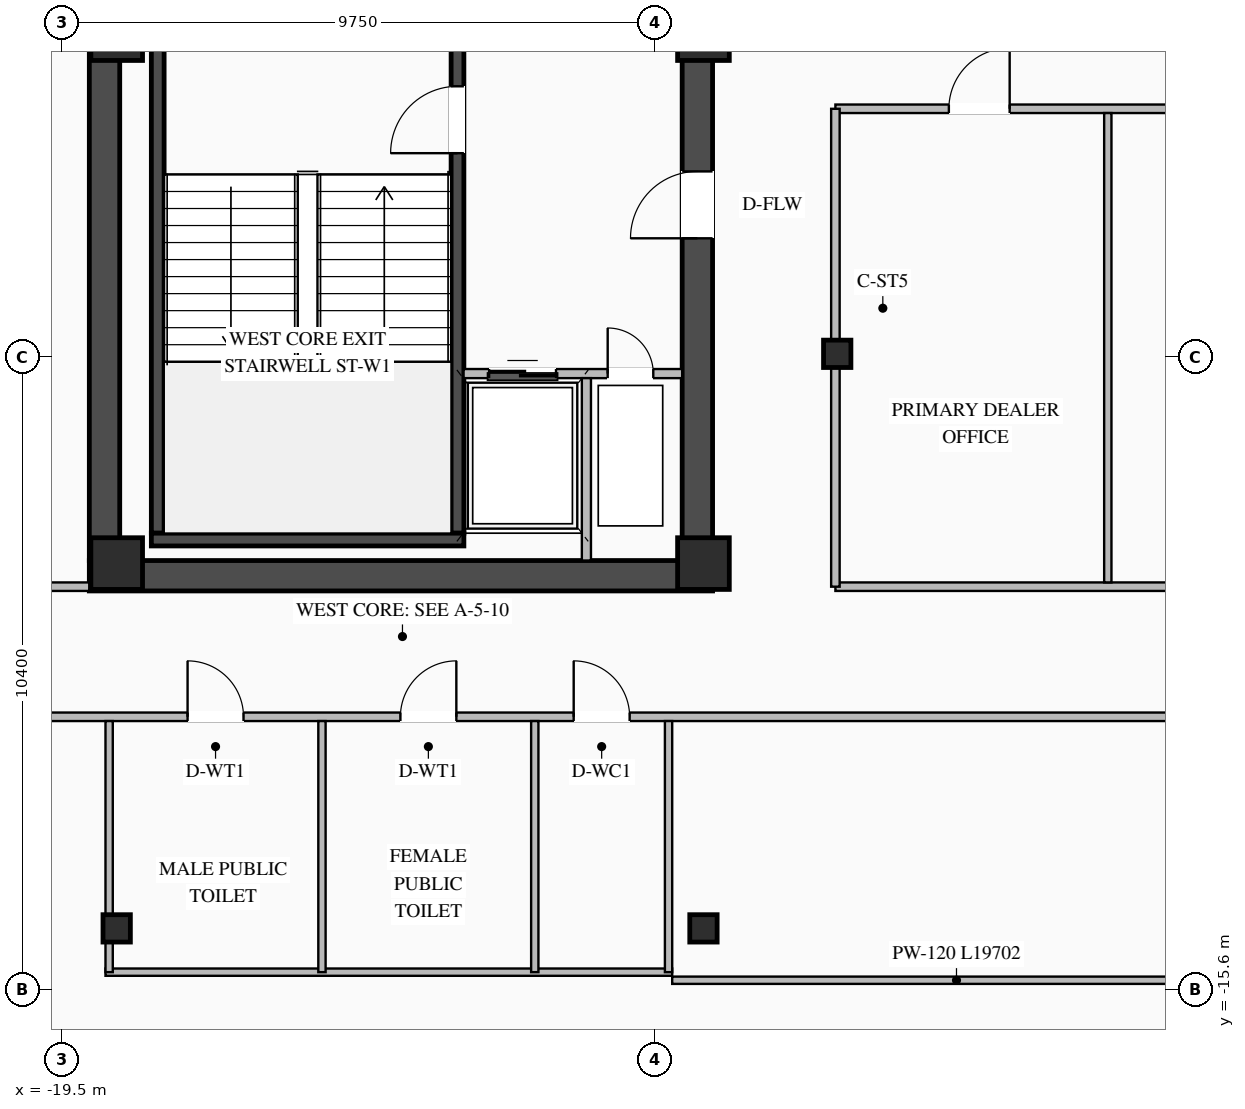
"""IFC4 building model, lengths in metres.
Left out: names, types, materials, properties, quantities, classifications, styles, units other than length and angle.
Written with IfcOpenShell. Run it as: python <this file> out.ifc"""

import sys

from ifc_helpers import new_model, si_unit, direction, frame, frame_2d, origin, origin_2d, place, context, subcontext, project, spatial, rectangle, i_section, extrude, element, fill, save


model = new_model("IFC4")
c1 = context("Model", 3, precision=1e-05, world=origin(), true_north=direction((0.0, 1.0)))
c2 = subcontext(c1, "Body", "Model", "MODEL_VIEW")
j1 = project(units=[si_unit("LENGTHUNIT", "METRE"), si_unit("PLANEANGLEUNIT", "RADIAN")], contexts=[c1])
p1 = place(None, origin())
s1 = spatial("IfcSite", under=j1, at=p1, CompositionType="ELEMENT")
p2 = place(p1, origin())
s2 = spatial("IfcBuilding", under=s1, at=p2, CompositionType="ELEMENT")
p3 = place(p2, frame((0.0, 0.0, 282.75)))
s3 = spatial("IfcBuildingStorey", under=s2, at=p3, CompositionType="ELEMENT", Elevation=282.75)
p4 = place(p3, frame((-19.05, -8.8, 0.0), z_axis=(0.0, 0.0, 1.0), x_axis=(1.0, 0.0, 0.0)))
e1 = element("IfcWall", 1, at=p4, inside=s3, PredefinedType="SHEAR", context=c2, shape_type="SweptSolid", body=[
    extrude(rectangle(XDim=10.25, YDim=0.5, at=frame_2d((5.125, 0.0))), origin(), (0.0, 0.0, 1.0), 3.95),
])
p5 = place(p3, frame((-18.8, -8.55, 0.0), z_axis=(0.0, 0.0, 1.0), x_axis=(0.0, 1.0, 0.0)))
e2 = element("IfcWall", 2, at=p5, inside=s3, PredefinedType="SHEAR", context=c2, shape_type="SweptSolid", body=[
    extrude(rectangle(XDim=17.1, YDim=0.5, at=frame_2d((8.55, 0.0))), origin(), (0.0, 0.0, 1.0), 3.95),
])
p6 = place(p3, frame((-9.05, -8.55, 0.0), z_axis=(0.0, 0.0, 1.0), x_axis=(0.0, 1.0, 0.0)))
e3 = element("IfcWall", 3, at=p6, inside=s3, PredefinedType="SHEAR", context=c2, shape_type="SweptSolid", body=[
    extrude(rectangle(XDim=17.1, YDim=0.5, at=frame_2d((8.55, 0.0))), origin(), (0.0, 0.0, 1.0), 3.95),
])
p7 = place(p6, frame((5.3, 0.0, 0.0)))
e4 = element("IfcOpeningElement", 4, at=p7, cuts=e3, PredefinedType="OPENING", context=c2, shape_type="SweptSolid", body=[
    extrude(rectangle(XDim=1.1, YDim=2.08, at=frame_2d((0.55, 1.04))), frame((0.0, 0.26, 0.0), z_axis=(0.0, -1.0, 0.0), x_axis=(1.0, 0.0, 0.0)), (0.0, 0.0, 1.0), 0.52),
])
p8 = place(p3, frame((-12.995, -8.1, 0.0), z_axis=(0.0, 0.0, 1.0), x_axis=(0.0, 1.0, 0.0)))
e5 = element("IfcWall", 5, at=p8, inside=s3, PredefinedType="SHEAR", context=c2, shape_type="SweptSolid", body=[
    extrude(rectangle(XDim=8.2, YDim=0.21, at=frame_2d((4.1, 0.0))), origin(), (0.0, 0.0, 1.0), 3.95),
])
p9 = place(p8, frame((6.25, 0.0, 0.0)))
e6 = element("IfcOpeningElement", 6, at=p9, cuts=e5, PredefinedType="OPENING", context=c2, shape_type="SweptSolid", body=[
    extrude(rectangle(XDim=1.1, YDim=2.15, at=frame_2d((0.55, 1.075))), frame((0.0, 0.115, 0.0), z_axis=(0.0, -1.0, 0.0), x_axis=(1.0, 0.0, 0.0)), (0.0, 0.0, 1.0), 0.23),
])
p10 = place(p3, frame((-17.925, -8.1, 0.0), z_axis=(0.0, 0.0, 1.0), x_axis=(0.0, 1.0, 0.0)))
e7 = element("IfcWall", 7, at=p10, inside=s3, PredefinedType="SHEAR", context=c2, shape_type="SweptSolid", body=[
    extrude(rectangle(XDim=8.2, YDim=0.21, at=frame_2d((4.1, 0.0))), origin(), (0.0, 0.0, 1.0), 3.95),
])
p11 = place(p3, frame((-18.03, -8.205, 0.0), z_axis=(0.0, 0.0, 1.0), x_axis=(1.0, 0.0, 0.0)))
e8 = element("IfcWall", 8, at=p11, inside=s3, PredefinedType="SHEAR", context=c2, shape_type="SweptSolid", body=[
    extrude(rectangle(XDim=5.14, YDim=0.21, at=frame_2d((2.57, 0.0))), origin(), (0.0, 0.0, 1.0), 3.95),
])
for number, where, z_axis, x_axis in (
    (9, (-8.95, -8.6, 0.0), (0.0, 0.0, 1.0), (1.0, 0.0, 0.0)),
    (10, (-8.95, 0.1, 0.0), (0.0, 0.0, 1.0), (1.0, 0.0, 0.0)),
    (11, (-18.6, -8.6, 0.0), (0.0, 0.0, 1.0), (1.0, 0.0, 0.0)),
    (12, (-18.6, 0.1, 0.0), (0.0, 0.0, 1.0), (1.0, 0.0, 0.0)),
):
    element("IfcColumn", number, at=place(p3, frame(where, z_axis=z_axis, x_axis=x_axis)), inside=s3, PredefinedType="COLUMN", context=c2, shape_type="SweptSolid", body=[
        extrude(rectangle(XDim=0.85, YDim=0.85, at=origin_2d()), origin(), (0.0, 0.0, 1.0), 4.2),
    ])
for number, where, z_axis, x_axis in (
    (13, (-6.75, -5.15, 0.0), (0.0, 0.0, 1.0), (1.0, 0.0, 0.0)),
    (14, (-18.6, -14.6, 0.0), (0.0, 0.0, 1.0), (1.0, 0.0, 0.0)),
    (15, (-8.95, -14.6, 0.0), (0.0, 0.0, 1.0), (1.0, 0.0, 0.0)),
):
    element("IfcColumn", number, at=place(p3, frame(where, z_axis=z_axis, x_axis=x_axis)), inside=s3, PredefinedType="COLUMN", context=c2, shape_type="SweptSolid", body=[
        extrude(i_section(OverallWidth=0.45, OverallDepth=0.45, WebThickness=0.022, FlangeThickness=0.032, at=origin_2d()), origin(), (0.0, 0.0, 1.0), 4.2),
    ])
p12 = place(p3, frame((-12.895, -5.475, 0.0), z_axis=(0.0, 0.0, 1.0), x_axis=(1.0, 0.0, 0.0)))
e16 = element("IfcWall", 16, at=p12, inside=s3, PredefinedType="STANDARD", context=c2, shape_type="SweptSolid", body=[
    extrude(rectangle(XDim=3.595, YDim=0.15, at=frame_2d((1.797, 0.0))), origin(), (0.0, 0.0, 1.0), 3.93),
])
p13 = place(p12, frame((0.42, 0.0, 0.0)))
e17 = element("IfcOpeningElement", 17, at=p13, cuts=e16, PredefinedType="OPENING", context=c2, shape_type="SweptSolid", body=[
    extrude(rectangle(XDim=1.1, YDim=2.15, at=frame_2d((0.55, 1.075))), frame((0.0, 0.085, 0.0), z_axis=(0.0, -1.0, 0.0), x_axis=(1.0, 0.0, 0.0)), (0.0, 0.0, 1.0), 0.17),
])
p14 = place(p12, frame((2.37, 0.0, 0.0)))
e18 = element("IfcOpeningElement", 18, at=p14, cuts=e16, PredefinedType="OPENING", context=c2, shape_type="SweptSolid", body=[
    extrude(rectangle(XDim=0.75, YDim=2.05, at=frame_2d((0.375, 1.025))), frame((0.0, 0.085, 0.0), z_axis=(0.0, -1.0, 0.0), x_axis=(1.0, 0.0, 0.0)), (0.0, 0.0, 1.0), 0.17),
])
p15 = place(p3, frame((-10.875, -8.55, 0.0), z_axis=(0.0, 0.0, 1.0), x_axis=(0.0, 1.0, 0.0)))
e19 = element("IfcWall", 19, at=p15, inside=s3, PredefinedType="STANDARD", context=c2, shape_type="SweptSolid", body=[
    extrude(rectangle(XDim=3.0, YDim=0.15, at=frame_2d((1.5, 0.0))), origin(), (0.0, 0.0, 1.0), 3.93),
])
p16 = place(p3, frame((-21.591, -11.12, 0.0), z_axis=(0.0, 0.0, 1.0), x_axis=(1.0, 0.0, 0.0)))
e20 = element("IfcWall", 20, at=p16, inside=s3, PredefinedType="STANDARD", context=c2, shape_type="SweptSolid", body=[
    extrude(rectangle(XDim=53.285, YDim=0.14, at=frame_2d((26.643, 0.0))), origin(), (0.0, 0.0, 1.0), 3.93),
])
p17 = place(p16, frame((4.157, 0.0, 0.0)))
e21 = element("IfcOpeningElement", 21, at=p17, cuts=e20, PredefinedType="OPENING", context=c2, shape_type="SweptSolid", body=[
    extrude(rectangle(XDim=0.92, YDim=2.08, at=frame_2d((0.46, 1.04))), frame((0.0, 0.08, 0.0), z_axis=(0.0, -1.0, 0.0), x_axis=(1.0, 0.0, 0.0)), (0.0, 0.0, 1.0), 0.16),
])
p18 = place(p16, frame((7.657, 0.0, 0.0)))
e22 = element("IfcOpeningElement", 22, at=p18, cuts=e20, PredefinedType="OPENING", context=c2, shape_type="SweptSolid", body=[
    extrude(rectangle(XDim=0.92, YDim=2.08, at=frame_2d((0.46, 1.04))), frame((0.0, 0.08, 0.0), z_axis=(0.0, -1.0, 0.0), x_axis=(1.0, 0.0, 0.0)), (0.0, 0.0, 1.0), 0.16),
])
p19 = place(p16, frame((10.507, 0.0, 0.0)))
e23 = element("IfcOpeningElement", 23, at=p19, cuts=e20, PredefinedType="OPENING", context=c2, shape_type="SweptSolid", body=[
    extrude(rectangle(XDim=0.92, YDim=2.08, at=frame_2d((0.46, 1.04))), frame((0.0, 0.08, 0.0), z_axis=(0.0, -1.0, 0.0), x_axis=(1.0, 0.0, 0.0)), (0.0, 0.0, 1.0), 0.16),
])
p20 = place(p16, frame((21.478, 0.0, 0.0)))
e24 = element("IfcOpeningElement", 24, at=p20, cuts=e20, PredefinedType="OPENING", context=c2, shape_type="SweptSolid", body=[
    extrude(rectangle(XDim=1.0, YDim=2.08, at=frame_2d((0.5, 1.04))), frame((0.0, 0.08, 0.0), z_axis=(0.0, -1.0, 0.0), x_axis=(1.0, 0.0, 0.0)), (0.0, 0.0, 1.0), 0.16),
])
p21 = place(p16, frame((41.961, 0.0, 0.0)))
e25 = element("IfcOpeningElement", 25, at=p21, cuts=e20, PredefinedType="OPENING", context=c2, shape_type="SweptSolid", body=[
    extrude(rectangle(XDim=1.0, YDim=2.08, at=frame_2d((0.5, 1.04))), frame((0.0, 0.08, 0.0), z_axis=(0.0, -1.0, 0.0), x_axis=(1.0, 0.0, 0.0)), (0.0, 0.0, 1.0), 0.16),
])
p22 = place(p3, frame((-18.784, -15.32, 0.0), z_axis=(0.0, 0.0, 1.0), x_axis=(1.0, 0.0, 0.0)))
e26 = element("IfcWall", 26, at=p22, inside=s3, PredefinedType="STANDARD", context=c2, shape_type="SweptSolid", body=[
    extrude(rectangle(XDim=9.32, YDim=0.12, at=frame_2d((4.66, 0.0))), origin(), (0.0, 0.0, 1.0), 3.93),
])
for number, where, z_axis, x_axis in (
    (27, (-18.724, -15.32, 0.0), (0.0, 0.0, 1.0), (0.0, 1.0, 0.0)),
    (28, (-15.224, -15.32, 0.0), (0.0, 0.0, 1.0), (0.0, 1.0, 0.0)),
    (29, (-11.724, -15.32, 0.0), (0.0, 0.0, 1.0), (0.0, 1.0, 0.0)),
    (30, (-9.524, -15.32, 0.0), (0.0, 0.0, 1.0), (0.0, 1.0, 0.0)),
):
    element("IfcWall", number, at=place(p3, frame(where, z_axis=z_axis, x_axis=x_axis)), inside=s3, PredefinedType="STANDARD", context=c2, shape_type="SweptSolid", body=[
        extrude(rectangle(XDim=4.13, YDim=0.12, at=frame_2d((2.065, 0.0))), origin(), (0.0, 0.0, 1.0), 3.93),
    ])
p23 = place(p3, frame((-9.464, -15.453, 0.0), z_axis=(0.0, 0.0, 1.0), x_axis=(1.0, 0.0, 0.0)))
e31 = element("IfcWall", 31, at=p23, inside=s3, PredefinedType="STANDARD", context=c2, shape_type="SweptSolid", body=[
    extrude(rectangle(XDim=19.702, YDim=0.12, at=frame_2d((9.851, 0.0))), origin(), (0.0, 0.0, 1.0), 3.93),
])
p24 = place(p23, frame((9.351, 0.0, 0.0)))
e32 = element("IfcOpeningElement", 32, at=p24, cuts=e31, PredefinedType="OPENING", context=c2, shape_type="SweptSolid", body=[
    extrude(rectangle(XDim=1.0, YDim=2.08, at=frame_2d((0.5, 1.04))), frame((0.0, 0.07, 0.0), z_axis=(0.0, -1.0, 0.0), x_axis=(1.0, 0.0, 0.0)), (0.0, 0.0, 1.0), 0.14),
])
p25 = place(p3, frame((-21.797, -8.98, 0.0), z_axis=(0.0, 0.0, 1.0), x_axis=(1.0, 0.0, 0.0)))
e33 = element("IfcWall", 33, at=p25, inside=s3, PredefinedType="STANDARD", context=c2, shape_type="SweptSolid", body=[
    extrude(rectangle(XDim=2.747, YDim=0.14, at=frame_2d((1.374, 0.0))), origin(), (0.0, 0.0, 1.0), 3.93),
])
p26 = place(p3, frame((-6.78, -1.12, 0.0), z_axis=(0.0, 0.0, 1.0), x_axis=(1.0, 0.0, 0.0)))
e34 = element("IfcWall", 34, at=p26, inside=s3, PredefinedType="STANDARD", context=c2, shape_type="SweptSolid", body=[
    extrude(rectangle(XDim=13.56, YDim=0.14, at=frame_2d((6.78, 0.0))), origin(), (0.0, 0.0, 1.0), 3.93),
])
p27 = place(p26, frame((1.866, 0.0, 0.0)))
e35 = element("IfcOpeningElement", 35, at=p27, cuts=e34, PredefinedType="OPENING", context=c2, shape_type="SweptSolid", body=[
    extrude(rectangle(XDim=1.0, YDim=2.08, at=frame_2d((0.5, 1.04))), frame((0.0, 0.08, 0.0), z_axis=(0.0, -1.0, 0.0), x_axis=(1.0, 0.0, 0.0)), (0.0, 0.0, 1.0), 0.16),
])
p28 = place(p26, frame((6.28, 0.0, 0.0)))
e36 = element("IfcOpeningElement", 36, at=p28, cuts=e34, PredefinedType="OPENING", context=c2, shape_type="SweptSolid", body=[
    extrude(rectangle(XDim=1.0, YDim=2.08, at=frame_2d((0.5, 1.04))), frame((0.0, 0.08, 0.0), z_axis=(0.0, -1.0, 0.0), x_axis=(1.0, 0.0, 0.0)), (0.0, 0.0, 1.0), 0.16),
])
p29 = place(p26, frame((10.694, 0.0, 0.0)))
e37 = element("IfcOpeningElement", 37, at=p29, cuts=e34, PredefinedType="OPENING", context=c2, shape_type="SweptSolid", body=[
    extrude(rectangle(XDim=1.0, YDim=2.08, at=frame_2d((0.5, 1.04))), frame((0.0, 0.08, 0.0), z_axis=(0.0, -1.0, 0.0), x_axis=(1.0, 0.0, 0.0)), (0.0, 0.0, 1.0), 0.16),
])
p30 = place(p3, frame((-6.78, -8.98, 0.0), z_axis=(0.0, 0.0, 1.0), x_axis=(1.0, 0.0, 0.0)))
e38 = element("IfcWall", 38, at=p30, inside=s3, PredefinedType="STANDARD", context=c2, shape_type="SweptSolid", body=[
    extrude(rectangle(XDim=13.56, YDim=0.14, at=frame_2d((6.78, 0.0))), origin(), (0.0, 0.0, 1.0), 3.93),
])
p31 = place(p3, frame((-6.78, -8.98, 0.0), z_axis=(0.0, 0.0, 1.0), x_axis=(0.0, 1.0, 0.0)))
e39 = element("IfcWall", 39, at=p31, inside=s3, PredefinedType="STANDARD", context=c2, shape_type="SweptSolid", body=[
    extrude(rectangle(XDim=7.86, YDim=0.14, at=frame_2d((3.93, 0.0))), origin(), (0.0, 0.0, 1.0), 3.425),
])
p32 = place(p3, frame((-2.3, -8.91, 0.0), z_axis=(0.0, 0.0, 1.0), x_axis=(0.0, 1.0, 0.0)))
e40 = element("IfcWall", 40, at=p32, inside=s3, PredefinedType="STANDARD", context=c2, shape_type="SweptSolid", body=[
    extrude(rectangle(XDim=7.72, YDim=0.12, at=frame_2d((3.86, 0.0))), origin(), (0.0, 0.0, 1.0), 3.93),
])
p33 = place(p9, origin())
e41 = element("IfcDoor", 41, at=p33, inside=s3, OperationType="SINGLE_SWING_LEFT", PredefinedType="DOOR", context=c2, shape_type="SweptSolid", body=[
    extrude(rectangle(XDim=1.1, YDim=2.15, at=frame_2d((0.55, 1.075))), frame((0.0, 0.025, 0.0), z_axis=(0.0, -1.0, 0.0), x_axis=(1.0, 0.0, 0.0)), (0.0, 0.0, 1.0), 0.05),
])
fill(e6, e41)
p34 = place(p13, origin())
e42 = element("IfcDoor", 42, at=p34, inside=s3, OperationType="DOUBLE_DOOR_SLIDING", PredefinedType="DOOR", context=c2, shape_type="SweptSolid", body=[
    extrude(rectangle(XDim=1.1, YDim=2.15, at=frame_2d((0.55, 1.075))), frame((0.0, 0.025, 0.0), z_axis=(0.0, -1.0, 0.0), x_axis=(1.0, 0.0, 0.0)), (0.0, 0.0, 1.0), 0.05),
])
fill(e17, e42)
p35 = place(p14, origin())
e43 = element("IfcDoor", 43, at=p35, inside=s3, OperationType="SINGLE_SWING_LEFT", PredefinedType="DOOR", context=c2, shape_type="SweptSolid", body=[
    extrude(rectangle(XDim=0.75, YDim=2.05, at=frame_2d((0.375, 1.025))), frame((0.0, 0.025, 0.0), z_axis=(0.0, -1.0, 0.0), x_axis=(1.0, 0.0, 0.0)), (0.0, 0.0, 1.0), 0.05),
])
fill(e18, e43)
p36 = place(p7, origin())
e44 = element("IfcDoor", 44, at=p36, inside=s3, OperationType="SINGLE_SWING_LEFT", PredefinedType="DOOR", context=c2, shape_type="SweptSolid", body=[
    extrude(rectangle(XDim=1.1, YDim=2.08, at=frame_2d((0.55, 1.04))), frame((0.0, 0.205, 0.0), z_axis=(0.0, -1.0, 0.0), x_axis=(1.0, 0.0, 0.0)), (0.0, 0.0, 1.0), 0.05),
])
fill(e4, e44)
p37 = place(p17, origin())
e45 = element("IfcDoor", 45, at=p37, inside=s3, OperationType="SINGLE_SWING_LEFT", PredefinedType="DOOR", context=c2, shape_type="SweptSolid", body=[
    extrude(rectangle(XDim=0.92, YDim=2.08, at=frame_2d((0.46, 1.04))), frame((0.0, 0.025, 0.0), z_axis=(0.0, -1.0, 0.0), x_axis=(1.0, 0.0, 0.0)), (0.0, 0.0, 1.0), 0.05),
])
fill(e21, e45)
p38 = place(p18, origin())
e46 = element("IfcDoor", 46, at=p38, inside=s3, OperationType="SINGLE_SWING_RIGHT", PredefinedType="DOOR", context=c2, shape_type="SweptSolid", body=[
    extrude(rectangle(XDim=0.92, YDim=2.08, at=frame_2d((0.46, 1.04))), frame((0.0, 0.025, 0.0), z_axis=(0.0, -1.0, 0.0), x_axis=(1.0, 0.0, 0.0)), (0.0, 0.0, 1.0), 0.05),
])
fill(e22, e46)
p39 = place(p19, origin())
e47 = element("IfcDoor", 47, at=p39, inside=s3, OperationType="SINGLE_SWING_LEFT", PredefinedType="DOOR", context=c2, shape_type="SweptSolid", body=[
    extrude(rectangle(XDim=0.92, YDim=2.08, at=frame_2d((0.46, 1.04))), frame((0.0, 0.025, 0.0), z_axis=(0.0, -1.0, 0.0), x_axis=(1.0, 0.0, 0.0)), (0.0, 0.0, 1.0), 0.05),
])
fill(e23, e47)
p40 = place(p27, origin())
e48 = element("IfcDoor", 48, at=p40, inside=s3, OperationType="SINGLE_SWING_RIGHT", PredefinedType="DOOR", context=c2, shape_type="SweptSolid", body=[
    extrude(rectangle(XDim=1.0, YDim=2.08, at=frame_2d((0.5, 1.04))), frame((0.0, 0.025, 0.0), z_axis=(0.0, -1.0, 0.0), x_axis=(1.0, 0.0, 0.0)), (0.0, 0.0, 1.0), 0.05),
])
fill(e35, e48)
save(model, sys.argv[1])
